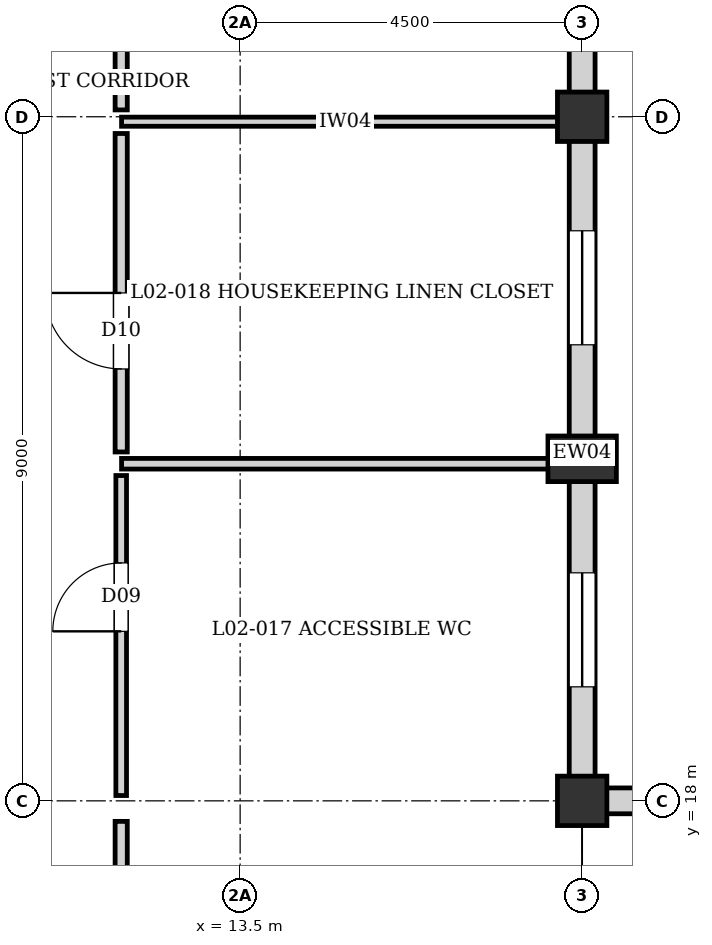
"""IFC4 building model, lengths in metres.
Left out: names, types, materials, properties, quantities, classifications, styles, units other than length and angle.
Written with IfcOpenShell. Run it as: python <this file> out.ifc"""

import sys

from ifc_helpers import new_model, si_unit, direction, frame, frame_2d, origin, origin_2d, place, context, subcontext, project, spatial, rectangle, extrude, element, fill, save


model = new_model("IFC4")
c1 = context("Model", 3, precision=1e-05, world=origin(), true_north=direction((0.0, 1.0)))
c2 = subcontext(c1, "Body", "Model", "MODEL_VIEW")
j1 = project(units=[si_unit("LENGTHUNIT", "METRE"), si_unit("PLANEANGLEUNIT", "RADIAN")], contexts=[c1])
p1 = place(None, origin())
s1 = spatial("IfcSite", under=j1, at=p1, CompositionType="ELEMENT")
p2 = place(p1, origin())
s2 = spatial("IfcBuilding", under=s1, at=p2, CompositionType="ELEMENT")
p3 = place(p2, frame((0.0, 0.0, 8.16)))
s3 = spatial("IfcBuildingStorey", under=s2, at=p3, CompositionType="ELEMENT", Elevation=8.16)
for number, where, z_axis, x_axis in (
    (1, (18.0, 18.0, 0.0), (0.0, 0.0, 1.0), (1.0, 0.0, 0.0)),
    (2, (18.0, 27.0, 0.0), (0.0, 0.0, 1.0), (1.0, 0.0, 0.0)),
):
    element("IfcColumn", number, at=place(p3, frame(where, z_axis=z_axis, x_axis=x_axis)), inside=s3, PredefinedType="COLUMN", context=c2, shape_type="SweptSolid", body=[
        extrude(rectangle(XDim=0.65, YDim=0.65, at=origin_2d()), origin(), (0.0, 0.0, 1.0), 3.36),
    ])
p4 = place(p3, frame((18.0, 22.5, 0.0), z_axis=(0.0, 0.0, 1.0), x_axis=(0.0, 1.0, 0.0)))
e3 = element("IfcColumn", 3, at=p4, inside=s3, PredefinedType="PILASTER", context=c2, shape_type="SweptSolid", body=[
    extrude(rectangle(XDim=0.6, YDim=0.9, at=origin_2d()), origin(), (0.0, 0.0, 1.0), 3.36),
])
p5 = place(p3, frame((18.0, 36.0, 0.0), z_axis=(0.0, 0.0, 1.0), x_axis=(0.0, -1.0, 0.0)))
e4 = element("IfcWall", 4, at=p5, inside=s3, PredefinedType="SOLIDWALL", context=c2, shape_type="SweptSolid", body=[
    extrude(rectangle(XDim=9.0, YDim=0.34, at=frame_2d((4.5, 0.0))), origin(), (0.0, 0.0, 1.0), 3.14),
])
p6 = place(p5, frame((1.5, 0.0, 0.35)))
e5 = element("IfcOpeningElement", 5, at=p6, cuts=e4, PredefinedType="OPENING", context=c2, shape_type="SweptSolid", body=[
    extrude(rectangle(XDim=1.5, YDim=1.8, at=frame_2d((0.75, 0.9))), frame((0.0, 0.18, 0.0), z_axis=(0.0, -1.0, 0.0), x_axis=(1.0, 0.0, 0.0)), (0.0, 0.0, 1.0), 0.36),
])
p7 = place(p5, frame((6.0, 0.0, 0.35)))
e6 = element("IfcOpeningElement", 6, at=p7, cuts=e4, PredefinedType="OPENING", context=c2, shape_type="SweptSolid", body=[
    extrude(rectangle(XDim=1.5, YDim=1.8, at=frame_2d((0.75, 0.9))), frame((0.0, 0.18, 0.0), z_axis=(0.0, -1.0, 0.0), x_axis=(1.0, 0.0, 0.0)), (0.0, 0.0, 1.0), 0.36),
])
p8 = place(p3, frame((18.0, 27.0, 0.0), z_axis=(0.0, 0.0, 1.0), x_axis=(0.0, -1.0, 0.0)))
e7 = element("IfcWall", 7, at=p8, inside=s3, PredefinedType="SOLIDWALL", context=c2, shape_type="SweptSolid", body=[
    extrude(rectangle(XDim=8.845, YDim=0.34, at=frame_2d((4.422, 0.0))), origin(), (0.0, 0.0, 1.0), 2.7),
])
p9 = place(p8, frame((1.5, 0.0, 0.35)))
e8 = element("IfcOpeningElement", 8, at=p9, cuts=e7, PredefinedType="OPENING", context=c2, shape_type="SweptSolid", body=[
    extrude(rectangle(XDim=1.5, YDim=1.8, at=frame_2d((0.75, 0.9))), frame((0.0, 0.18, 0.0), z_axis=(0.0, -1.0, 0.0), x_axis=(1.0, 0.0, 0.0)), (0.0, 0.0, 1.0), 0.36),
])
p10 = place(p8, frame((6.0, 0.0, 0.35)))
e9 = element("IfcOpeningElement", 9, at=p10, cuts=e7, PredefinedType="OPENING", context=c2, shape_type="SweptSolid", body=[
    extrude(rectangle(XDim=1.5, YDim=1.8, at=frame_2d((0.75, 0.9))), frame((0.0, 0.18, 0.0), z_axis=(0.0, -1.0, 0.0), x_axis=(1.0, 0.0, 0.0)), (0.0, 0.0, 1.0), 0.36),
])
p11 = place(p3, frame((18.0, 18.0, 0.0), z_axis=(0.0, 0.0, 1.0), x_axis=(1.0, 0.0, 0.0)))
e10 = element("IfcWall", 10, at=p11, inside=s3, PredefinedType="SOLIDWALL", context=c2, shape_type="SweptSolid", body=[
    extrude(rectangle(XDim=9.0, YDim=0.34, at=frame_2d((4.5, 0.0))), origin(), (0.0, 0.0, 1.0), 2.74),
])
p12 = place(p11, frame((1.5, 0.0, 0.35)))
e11 = element("IfcOpeningElement", 11, at=p12, cuts=e10, PredefinedType="OPENING", context=c2, shape_type="SweptSolid", body=[
    extrude(rectangle(XDim=1.5, YDim=1.8, at=frame_2d((0.75, 0.9))), frame((0.0, 0.18, 0.0), z_axis=(0.0, -1.0, 0.0), x_axis=(1.0, 0.0, 0.0)), (0.0, 0.0, 1.0), 0.36),
])
p13 = place(p11, frame((6.0, 0.0, 0.35)))
e12 = element("IfcOpeningElement", 12, at=p13, cuts=e10, PredefinedType="OPENING", context=c2, shape_type="SweptSolid", body=[
    extrude(rectangle(XDim=1.5, YDim=1.8, at=frame_2d((0.75, 0.9))), frame((0.0, 0.18, 0.0), z_axis=(0.0, -1.0, 0.0), x_axis=(1.0, 0.0, 0.0)), (0.0, 0.0, 1.0), 0.36),
])
p14 = place(p3, frame((11.935, 11.94, 0.0), z_axis=(0.0, 0.0, 1.0), x_axis=(0.0, 1.0, 0.0)))
e13 = element("IfcWall", 13, at=p14, inside=s3, PredefinedType="PARTITIONING", context=c2, shape_type="SweptSolid", body=[
    extrude(rectangle(XDim=5.79, YDim=0.16, at=frame_2d((2.895, 0.0))), origin(), (0.0, 0.0, 1.0), 3.14),
])
p15 = place(p3, frame((11.94, 22.435, 0.0), z_axis=(0.0, 0.0, 1.0), x_axis=(1.0, 0.0, 0.0)))
e14 = element("IfcWall", 14, at=p15, inside=s3, PredefinedType="PLUMBINGWALL", context=c2, shape_type="SweptSolid", body=[
    extrude(rectangle(XDim=5.885, YDim=0.14, at=frame_2d((2.942, 0.0))), origin(), (0.0, 0.0, 1.0), 3.14),
])
p16 = place(p3, frame((11.94, 26.935, 0.0), z_axis=(0.0, 0.0, 1.0), x_axis=(1.0, 0.0, 0.0)))
e15 = element("IfcWall", 15, at=p16, inside=s3, PredefinedType="PARTITIONING", context=c2, shape_type="SweptSolid", body=[
    extrude(rectangle(XDim=5.885, YDim=0.12, at=frame_2d((2.942, 0.0))), origin(), (0.0, 0.0, 1.0), 2.77),
])
p17 = place(p3, frame((11.935, 18.07, 0.0), z_axis=(0.0, 0.0, 1.0), x_axis=(0.0, 1.0, 0.0)))
e16 = element("IfcWall", 16, at=p17, inside=s3, PredefinedType="PLUMBINGWALL", context=c2, shape_type="SweptSolid", body=[
    extrude(rectangle(XDim=4.21, YDim=0.14, at=frame_2d((2.105, 0.0))), origin(), (0.0, 0.0, 1.0), 3.14),
])
p18 = place(p17, frame((2.16, 0.0, 0.0)))
e17 = element("IfcOpeningElement", 17, at=p18, cuts=e16, PredefinedType="OPENING", context=c2, shape_type="SweptSolid", body=[
    extrude(rectangle(XDim=0.9, YDim=2.1, at=frame_2d((0.45, 1.05))), frame((0.0, 0.08, 0.0), z_axis=(0.0, -1.0, 0.0), x_axis=(1.0, 0.0, 0.0)), (0.0, 0.0, 1.0), 0.16),
])
p19 = place(p3, frame((11.935, 22.59, 0.0), z_axis=(0.0, 0.0, 1.0), x_axis=(0.0, 1.0, 0.0)))
e18 = element("IfcWall", 18, at=p19, inside=s3, PredefinedType="PARTITIONING", context=c2, shape_type="SweptSolid", body=[
    extrude(rectangle(XDim=4.19, YDim=0.16, at=frame_2d((2.095, 0.0))), origin(), (0.0, 0.0, 1.0), 3.14),
])
p20 = place(p19, frame((1.092, 0.0, 0.0)))
e19 = element("IfcOpeningElement", 19, at=p20, cuts=e18, PredefinedType="OPENING", context=c2, shape_type="SweptSolid", body=[
    extrude(rectangle(XDim=1.0, YDim=2.1, at=frame_2d((0.5, 1.05))), frame((0.0, 0.09, 0.0), z_axis=(0.0, -1.0, 0.0), x_axis=(1.0, 0.0, 0.0)), (0.0, 0.0, 1.0), 0.18),
])
p21 = place(p3, frame((11.935, 27.09, 0.0), z_axis=(0.0, 0.0, 1.0), x_axis=(0.0, 1.0, 0.0)))
e20 = element("IfcWall", 20, at=p21, inside=s3, PredefinedType="PARTITIONING", context=c2, shape_type="SweptSolid", body=[
    extrude(rectangle(XDim=44.815, YDim=0.16, at=frame_2d((22.407, 0.0))), origin(), (0.0, 0.0, 1.0), 3.14),
])
p22 = place(p21, frame((21.607, 0.0, 0.0)))
e21 = element("IfcOpeningElement", 21, at=p22, cuts=e20, PredefinedType="OPENING", context=c2, shape_type="SweptSolid", body=[
    extrude(rectangle(XDim=1.6, YDim=2.3, at=frame_2d((0.8, 1.15))), frame((0.0, 0.09, 0.0), z_axis=(0.0, -1.0, 0.0), x_axis=(1.0, 0.0, 0.0)), (0.0, 0.0, 1.0), 0.18),
])
p23 = place(p9, origin())
e22 = element("IfcWindow", 22, at=p23, inside=s3, PartitioningType="SINGLE_PANEL", PredefinedType="WINDOW", context=c2, shape_type="SweptSolid", body=[
    extrude(rectangle(XDim=1.5, YDim=1.8, at=frame_2d((0.75, 0.9))), frame((0.0, 0.03, 0.0), z_axis=(0.0, -1.0, 0.0), x_axis=(1.0, 0.0, 0.0)), (0.0, 0.0, 1.0), 0.06),
])
fill(e8, e22)
p24 = place(p10, origin())
e23 = element("IfcWindow", 23, at=p24, inside=s3, PartitioningType="SINGLE_PANEL", PredefinedType="WINDOW", context=c2, shape_type="SweptSolid", body=[
    extrude(rectangle(XDim=1.5, YDim=1.8, at=frame_2d((0.75, 0.9))), frame((0.0, 0.03, 0.0), z_axis=(0.0, -1.0, 0.0), x_axis=(1.0, 0.0, 0.0)), (0.0, 0.0, 1.0), 0.06),
])
fill(e9, e23)
p25 = place(p18, origin())
e24 = element("IfcDoor", 24, at=p25, inside=s3, OperationType="SINGLE_SWING_LEFT", PredefinedType="DOOR", context=c2, shape_type="SweptSolid", body=[
    extrude(rectangle(XDim=0.9, YDim=2.1, at=frame_2d((0.45, 1.05))), frame((0.0, 0.025, 0.0), z_axis=(0.0, -1.0, 0.0), x_axis=(1.0, 0.0, 0.0)), (0.0, 0.0, 1.0), 0.05),
])
fill(e17, e24)
p26 = place(p20, origin())
e25 = element("IfcDoor", 25, at=p26, inside=s3, OperationType="SINGLE_SWING_RIGHT", PredefinedType="DOOR", context=c2, shape_type="SweptSolid", body=[
    extrude(rectangle(XDim=1.0, YDim=2.1, at=frame_2d((0.5, 1.05))), frame((0.0, 0.025, 0.0), z_axis=(0.0, -1.0, 0.0), x_axis=(1.0, 0.0, 0.0)), (0.0, 0.0, 1.0), 0.05),
])
fill(e19, e25)
save(model, sys.argv[1])
